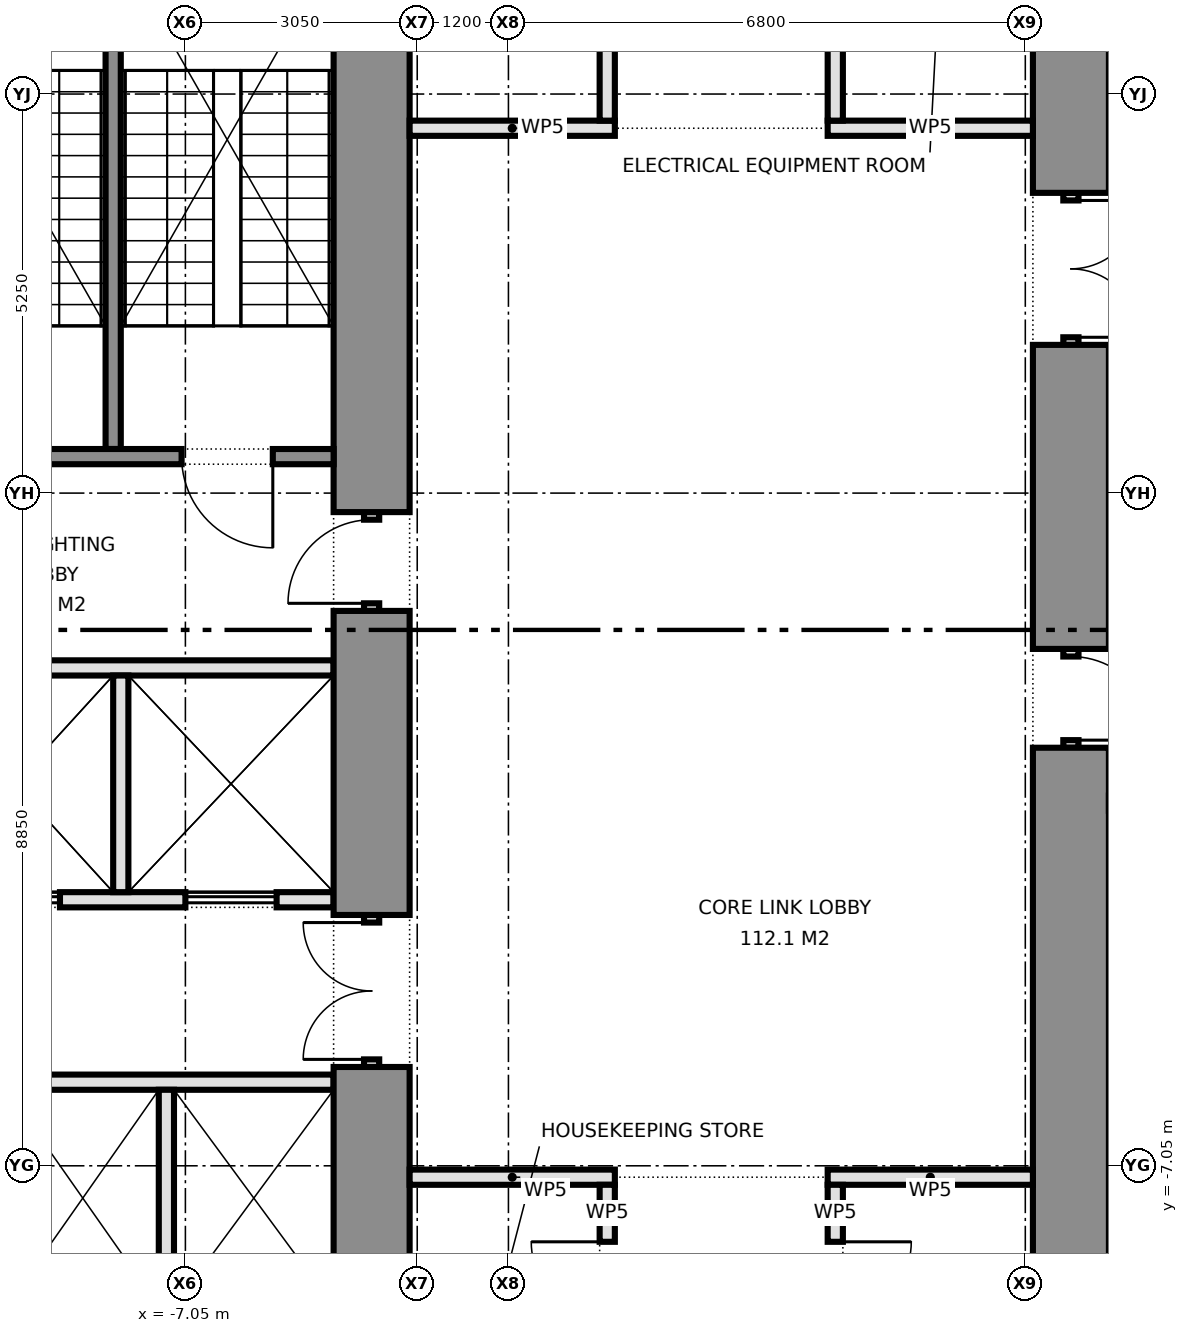
"""IFC4 building model, lengths in metres.
Left out: names, types, materials, properties, quantities, classifications, styles, units other than length and angle.
Written with IfcOpenShell. Run it as: python <this file> out.ifc"""

import sys

from ifc_helpers import new_model, si_unit, direction, frame, frame_2d, origin, place, context, subcontext, project, spatial, rectangle, extrude, element, fill, save


model = new_model("IFC4")
c1 = context("Model", 3, precision=1e-05, world=origin(), true_north=direction((0.0, 1.0)))
c2 = subcontext(c1, "Body", "Model", "MODEL_VIEW")
j1 = project(units=[si_unit("LENGTHUNIT", "METRE"), si_unit("PLANEANGLEUNIT", "RADIAN")], contexts=[c1])
p1 = place(None, origin())
s1 = spatial("IfcSite", under=j1, at=p1, CompositionType="ELEMENT")
p2 = place(p1, origin())
s2 = spatial("IfcBuilding", under=s1, at=p2, CompositionType="ELEMENT")
p3 = place(p2, frame((0.0, 0.0, 99.6)))
s3 = spatial("IfcBuildingStorey", under=s2, at=p3, CompositionType="ELEMENT", Elevation=99.6)
p4 = place(p3, frame((-4.6, -8.9, 0.0), z_axis=(0.0, 0.0, 1.0), x_axis=(0.0, 1.0, 0.0)))
e1 = element("IfcWall", 1, at=p4, inside=s3, PredefinedType="SHEAR", context=c2, shape_type="SweptSolid", body=[
    extrude(rectangle(XDim=3.15, YDim=1.0, at=frame_2d((1.575, 0.0))), origin(), (0.0, 0.0, 1.0), 4.2),
])
p5 = place(p3, frame((-4.6, -5.75, 0.0), z_axis=(0.0, 0.0, 1.0), x_axis=(0.0, 1.0, 0.0)))
e2 = element("IfcWall", 2, at=p5, inside=s3, PredefinedType="PARTITIONING", context=c2, shape_type="SweptSolid", body=[
    extrude(rectangle(XDim=2.0, YDim=0.2, at=frame_2d((1.0, 0.0))), origin(), (0.0, 0.0, 1.0), 2.4),
])
p6 = place(p5, frame((0.1, 0.0, 0.0)))
e3 = element("IfcOpeningElement", 3, at=p6, cuts=e2, PredefinedType="OPENING", context=c2, shape_type="SweptSolid", body=[
    extrude(rectangle(XDim=1.8, YDim=2.1, at=frame_2d((0.9, 1.05))), frame((0.0, 0.11, 0.0), z_axis=(0.0, -1.0, 0.0), x_axis=(1.0, 0.0, 0.0)), (0.0, 0.0, 1.0), 0.22),
])
p7 = place(p3, frame((-4.6, -3.75, 0.0), z_axis=(0.0, 0.0, 1.0), x_axis=(0.0, 1.0, 0.0)))
e4 = element("IfcWall", 4, at=p7, inside=s3, PredefinedType="SHEAR", context=c2, shape_type="SweptSolid", body=[
    extrude(rectangle(XDim=4.0, YDim=1.0, at=frame_2d((2.0, 0.0))), origin(), (0.0, 0.0, 1.0), 4.2),
])
p8 = place(p3, frame((-4.6, 0.25, 0.0), z_axis=(0.0, 0.0, 1.0), x_axis=(0.0, 1.0, 0.0)))
e5 = element("IfcWall", 5, at=p8, inside=s3, PredefinedType="PARTITIONING", context=c2, shape_type="SweptSolid", body=[
    extrude(rectangle(XDim=1.3, YDim=0.2, at=frame_2d((0.65, 0.0))), origin(), (0.0, 0.0, 1.0), 2.4),
])
p9 = place(p8, frame((0.1, 0.0, 0.0)))
e6 = element("IfcOpeningElement", 6, at=p9, cuts=e5, PredefinedType="OPENING", context=c2, shape_type="SweptSolid", body=[
    extrude(rectangle(XDim=1.1, YDim=2.1, at=frame_2d((0.55, 1.05))), frame((0.0, 0.11, 0.0), z_axis=(0.0, -1.0, 0.0), x_axis=(1.0, 0.0, 0.0)), (0.0, 0.0, 1.0), 0.22),
])
p10 = place(p3, frame((-4.6, 1.55, 0.0), z_axis=(0.0, 0.0, 1.0), x_axis=(0.0, 1.0, 0.0)))
e7 = element("IfcWall", 7, at=p10, inside=s3, PredefinedType="SHEAR", context=c2, shape_type="SweptSolid", body=[
    extrude(rectangle(XDim=7.35, YDim=1.0, at=frame_2d((3.675, 0.0))), origin(), (0.0, 0.0, 1.0), 4.2),
])
p11 = place(p3, frame((-13.9, -5.95, 0.0), z_axis=(0.0, 0.0, 1.0), x_axis=(1.0, 0.0, 0.0)))
e8 = element("IfcWall", 8, at=p11, inside=s3, PredefinedType="PARTITIONING", context=c2, shape_type="SweptSolid", body=[
    extrude(rectangle(XDim=8.8, YDim=0.2, at=frame_2d((4.4, 0.0))), origin(), (0.0, 0.0, 1.0), 4.2),
])
p12 = place(p11, frame((1.7, 0.0, 0.0)))
e9 = element("IfcOpeningElement", 9, at=p12, cuts=e8, PredefinedType="OPENING", context=c2, shape_type="SweptSolid", body=[
    extrude(rectangle(XDim=0.9, YDim=2.1, at=frame_2d((0.45, 1.05))), frame((0.0, 0.11, 0.0), z_axis=(0.0, -1.0, 0.0), x_axis=(1.0, 0.0, 0.0)), (0.0, 0.0, 1.0), 0.22),
])
p13 = place(p3, frame((-13.9, -3.55, 0.0), z_axis=(0.0, 0.0, 1.0), x_axis=(1.0, 0.0, 0.0)))
e10 = element("IfcWall", 10, at=p13, inside=s3, PredefinedType="PARTITIONING", context=c2, shape_type="SweptSolid", body=[
    extrude(rectangle(XDim=8.8, YDim=0.2, at=frame_2d((4.4, 0.0))), origin(), (0.0, 0.0, 1.0), 4.2),
])
p14 = place(p13, frame((0.65, 0.0, 0.0)))
e11 = element("IfcOpeningElement", 11, at=p14, cuts=e10, PredefinedType="OPENING", context=c2, shape_type="SweptSolid", body=[
    extrude(rectangle(XDim=1.8, YDim=2.1, at=frame_2d((0.9, 1.05))), frame((0.0, 0.11, 0.0), z_axis=(0.0, -1.0, 0.0), x_axis=(1.0, 0.0, 0.0)), (0.0, 0.0, 1.0), 0.22),
])
p15 = place(p13, frame((4.0, 0.0, 0.0)))
e12 = element("IfcOpeningElement", 12, at=p15, cuts=e10, PredefinedType="OPENING", context=c2, shape_type="SweptSolid", body=[
    extrude(rectangle(XDim=1.2, YDim=2.1, at=frame_2d((0.6, 1.05))), frame((0.0, 0.11, 0.0), z_axis=(0.0, -1.0, 0.0), x_axis=(1.0, 0.0, 0.0)), (0.0, 0.0, 1.0), 0.22),
])
p16 = place(p13, frame((6.85, 0.0, 0.0)))
e13 = element("IfcOpeningElement", 13, at=p16, cuts=e10, PredefinedType="OPENING", context=c2, shape_type="SweptSolid", body=[
    extrude(rectangle(XDim=1.2, YDim=2.1, at=frame_2d((0.6, 1.05))), frame((0.0, 0.11, 0.0), z_axis=(0.0, -1.0, 0.0), x_axis=(1.0, 0.0, 0.0)), (0.0, 0.0, 1.0), 0.22),
])
p17 = place(p3, frame((-13.9, -0.5, 0.0), z_axis=(0.0, 0.0, 1.0), x_axis=(1.0, 0.0, 0.0)))
e14 = element("IfcWall", 14, at=p17, inside=s3, PredefinedType="PARTITIONING", context=c2, shape_type="SweptSolid", body=[
    extrude(rectangle(XDim=8.8, YDim=0.2, at=frame_2d((4.4, 0.0))), origin(), (0.0, 0.0, 1.0), 4.2),
])
p18 = place(p3, frame((-13.9, 2.28, 0.0), z_axis=(0.0, 0.0, 1.0), x_axis=(1.0, 0.0, 0.0)))
e15 = element("IfcWall", 15, at=p18, inside=s3, PredefinedType="SHEAR", context=c2, shape_type="SweptSolid", body=[
    extrude(rectangle(XDim=8.8, YDim=0.2, at=frame_2d((4.4, 0.0))), origin(), (0.0, 0.0, 1.0), 4.2),
])
p19 = place(p18, frame((3.8, 0.0, 0.0)))
e16 = element("IfcOpeningElement", 16, at=p19, cuts=e15, PredefinedType="OPENING", context=c2, shape_type="SweptSolid", body=[
    extrude(rectangle(XDim=1.2, YDim=2.1, at=frame_2d((0.6, 1.05))), frame((0.0, 0.11, 0.0), z_axis=(0.0, -1.0, 0.0), x_axis=(1.0, 0.0, 0.0)), (0.0, 0.0, 1.0), 0.22),
])
p20 = place(p18, frame((6.8, 0.0, 0.0)))
e17 = element("IfcOpeningElement", 17, at=p20, cuts=e15, PredefinedType="OPENING", context=c2, shape_type="SweptSolid", body=[
    extrude(rectangle(XDim=1.2, YDim=2.1, at=frame_2d((0.6, 1.05))), frame((0.0, 0.11, 0.0), z_axis=(0.0, -1.0, 0.0), x_axis=(1.0, 0.0, 0.0)), (0.0, 0.0, 1.0), 0.22),
])
p21 = place(p3, frame((-8.0, 2.38, 0.0), z_axis=(0.0, 0.0, 1.0), x_axis=(0.0, 1.0, 0.0)))
e18 = element("IfcWall", 18, at=p21, inside=s3, PredefinedType="SHEAR", context=c2, shape_type="SweptSolid", body=[
    extrude(rectangle(XDim=6.52, YDim=0.2, at=frame_2d((3.26, 0.0))), origin(), (0.0, 0.0, 1.0), 4.2),
])
for number, where, z_axis, x_axis in (
    (19, (-7.3, -8.9, 0.0), (0.0, 0.0, 1.0), (0.0, 1.0, 0.0)),
    (20, (-7.9, -3.45, 0.0), (0.0, 0.0, 1.0), (0.0, 1.0, 0.0)),
):
    element("IfcWall", number, at=place(p3, frame(where, z_axis=z_axis, x_axis=x_axis)), inside=s3, PredefinedType="PARTITIONING", context=c2, shape_type="SweptSolid", body=[
        extrude(rectangle(XDim=2.85, YDim=0.2, at=frame_2d((1.425, 0.0))), origin(), (0.0, 0.0, 1.0), 4.2),
    ])
p22 = place(p3, frame((4.6, 8.9, 0.0), z_axis=(0.0, 0.0, 1.0), x_axis=(0.0, -1.0, 0.0)))
e21 = element("IfcWall", 21, at=p22, inside=s3, PredefinedType="SHEAR", context=c2, shape_type="SweptSolid", body=[
    extrude(rectangle(XDim=3.15, YDim=1.0, at=frame_2d((1.575, 0.0))), origin(), (0.0, 0.0, 1.0), 4.2),
])
p23 = place(p3, frame((4.6, 5.75, 0.0), z_axis=(0.0, 0.0, 1.0), x_axis=(0.0, -1.0, 0.0)))
e22 = element("IfcWall", 22, at=p23, inside=s3, PredefinedType="PARTITIONING", context=c2, shape_type="SweptSolid", body=[
    extrude(rectangle(XDim=2.0, YDim=0.2, at=frame_2d((1.0, 0.0))), origin(), (0.0, 0.0, 1.0), 2.4),
])
p24 = place(p23, frame((0.1, 0.0, 0.0)))
e23 = element("IfcOpeningElement", 23, at=p24, cuts=e22, PredefinedType="OPENING", context=c2, shape_type="SweptSolid", body=[
    extrude(rectangle(XDim=1.8, YDim=2.1, at=frame_2d((0.9, 1.05))), frame((0.0, 0.11, 0.0), z_axis=(0.0, -1.0, 0.0), x_axis=(1.0, 0.0, 0.0)), (0.0, 0.0, 1.0), 0.22),
])
p25 = place(p3, frame((4.6, 3.75, 0.0), z_axis=(0.0, 0.0, 1.0), x_axis=(0.0, -1.0, 0.0)))
e24 = element("IfcWall", 24, at=p25, inside=s3, PredefinedType="SHEAR", context=c2, shape_type="SweptSolid", body=[
    extrude(rectangle(XDim=4.0, YDim=1.0, at=frame_2d((2.0, 0.0))), origin(), (0.0, 0.0, 1.0), 4.2),
])
p26 = place(p3, frame((4.6, -0.25, 0.0), z_axis=(0.0, 0.0, 1.0), x_axis=(0.0, -1.0, 0.0)))
e25 = element("IfcWall", 25, at=p26, inside=s3, PredefinedType="PARTITIONING", context=c2, shape_type="SweptSolid", body=[
    extrude(rectangle(XDim=1.3, YDim=0.2, at=frame_2d((0.65, 0.0))), origin(), (0.0, 0.0, 1.0), 2.4),
])
p27 = place(p26, frame((0.1, 0.0, 0.0)))
e26 = element("IfcOpeningElement", 26, at=p27, cuts=e25, PredefinedType="OPENING", context=c2, shape_type="SweptSolid", body=[
    extrude(rectangle(XDim=1.1, YDim=2.1, at=frame_2d((0.55, 1.05))), frame((0.0, 0.11, 0.0), z_axis=(0.0, -1.0, 0.0), x_axis=(1.0, 0.0, 0.0)), (0.0, 0.0, 1.0), 0.22),
])
p28 = place(p3, frame((4.6, -1.55, 0.0), z_axis=(0.0, 0.0, 1.0), x_axis=(0.0, -1.0, 0.0)))
e27 = element("IfcWall", 27, at=p28, inside=s3, PredefinedType="SHEAR", context=c2, shape_type="SweptSolid", body=[
    extrude(rectangle(XDim=7.35, YDim=1.0, at=frame_2d((3.675, 0.0))), origin(), (0.0, 0.0, 1.0), 4.2),
])
for number, where, z_axis, x_axis in (
    (28, (-4.1, -7.2, 0.0), (0.0, 0.0, 1.0), (1.0, 0.0, 0.0)),
    (29, (1.4, -7.2, 0.0), (0.0, 0.0, 1.0), (1.0, 0.0, 0.0)),
    (30, (-4.1, 6.6, 0.0), (0.0, 0.0, 1.0), (1.0, 0.0, 0.0)),
    (31, (1.4, 6.6, 0.0), (0.0, 0.0, 1.0), (1.0, 0.0, 0.0)),
):
    element("IfcWall", number, at=place(p3, frame(where, z_axis=z_axis, x_axis=x_axis)), inside=s3, PredefinedType="PARTITIONING", context=c2, shape_type="SweptSolid", body=[
        extrude(rectangle(XDim=2.7, YDim=0.2, at=frame_2d((1.35, 0.0))), origin(), (0.0, 0.0, 1.0), 4.2),
    ])
p29 = place(p3, frame((1.5, -9.8, 0.0), z_axis=(0.0, 0.0, 1.0), x_axis=(0.0, 1.0, 0.0)))
e32 = element("IfcWall", 32, at=p29, inside=s3, PredefinedType="PARTITIONING", context=c2, shape_type="SweptSolid", body=[
    extrude(rectangle(XDim=2.5, YDim=0.2, at=frame_2d((1.25, 0.0))), origin(), (0.0, 0.0, 1.0), 4.2),
])
p30 = place(p29, frame((0.75, 0.0, 0.0)))
e33 = element("IfcOpeningElement", 33, at=p30, cuts=e32, PredefinedType="OPENING", context=c2, shape_type="SweptSolid", body=[
    extrude(rectangle(XDim=1.0, YDim=2.1, at=frame_2d((0.5, 1.05))), frame((0.0, 0.11, 0.0), z_axis=(0.0, -1.0, 0.0), x_axis=(1.0, 0.0, 0.0)), (0.0, 0.0, 1.0), 0.22),
])
p31 = place(p3, frame((1.5, 6.7, 0.0), z_axis=(0.0, 0.0, 1.0), x_axis=(0.0, 1.0, 0.0)))
e34 = element("IfcWall", 34, at=p31, inside=s3, PredefinedType="PARTITIONING", context=c2, shape_type="SweptSolid", body=[
    extrude(rectangle(XDim=3.1, YDim=0.2, at=frame_2d((1.55, 0.0))), origin(), (0.0, 0.0, 1.0), 4.2),
])
p32 = place(p31, frame((0.95, 0.0, 0.0)))
e35 = element("IfcOpeningElement", 35, at=p32, cuts=e34, PredefinedType="OPENING", context=c2, shape_type="SweptSolid", body=[
    extrude(rectangle(XDim=1.2, YDim=2.1, at=frame_2d((0.6, 1.05))), frame((0.0, 0.11, 0.0), z_axis=(0.0, -1.0, 0.0), x_axis=(1.0, 0.0, 0.0)), (0.0, 0.0, 1.0), 0.22),
])
p33 = place(p3, frame((-1.5, -9.8, 0.0), z_axis=(0.0, 0.0, 1.0), x_axis=(0.0, 1.0, 0.0)))
e36 = element("IfcWall", 36, at=p33, inside=s3, PredefinedType="PARTITIONING", context=c2, shape_type="SweptSolid", body=[
    extrude(rectangle(XDim=2.5, YDim=0.2, at=frame_2d((1.25, 0.0))), origin(), (0.0, 0.0, 1.0), 4.2),
])
p34 = place(p33, frame((0.75, 0.0, 0.0)))
e37 = element("IfcOpeningElement", 37, at=p34, cuts=e36, PredefinedType="OPENING", context=c2, shape_type="SweptSolid", body=[
    extrude(rectangle(XDim=1.0, YDim=2.1, at=frame_2d((0.5, 1.05))), frame((0.0, 0.11, 0.0), z_axis=(0.0, -1.0, 0.0), x_axis=(1.0, 0.0, 0.0)), (0.0, 0.0, 1.0), 0.22),
])
p35 = place(p3, frame((-1.5, 6.7, 0.0), z_axis=(0.0, 0.0, 1.0), x_axis=(0.0, 1.0, 0.0)))
e38 = element("IfcWall", 38, at=p35, inside=s3, PredefinedType="PARTITIONING", context=c2, shape_type="SweptSolid", body=[
    extrude(rectangle(XDim=3.1, YDim=0.2, at=frame_2d((1.55, 0.0))), origin(), (0.0, 0.0, 1.0), 4.2),
])
p36 = place(p35, frame((0.95, 0.0, 0.0)))
e39 = element("IfcOpeningElement", 39, at=p36, cuts=e38, PredefinedType="OPENING", context=c2, shape_type="SweptSolid", body=[
    extrude(rectangle(XDim=1.2, YDim=2.1, at=frame_2d((0.6, 1.05))), frame((0.0, 0.11, 0.0), z_axis=(0.0, -1.0, 0.0), x_axis=(1.0, 0.0, 0.0)), (0.0, 0.0, 1.0), 0.22),
])
p37 = place(p6, origin())
e40 = element("IfcDoor", 40, at=p37, inside=s3, OperationType="DOUBLE_DOOR_SINGLE_SWING", PredefinedType="DOOR", context=c2, shape_type="SweptSolid", body=[
    extrude(rectangle(XDim=1.8, YDim=2.1, at=frame_2d((0.9, 1.05))), frame((0.0, 0.025, 0.0), z_axis=(0.0, -1.0, 0.0), x_axis=(1.0, 0.0, 0.0)), (0.0, 0.0, 1.0), 0.05),
])
fill(e3, e40)
p38 = place(p9, origin())
e41 = element("IfcDoor", 41, at=p38, inside=s3, OperationType="SINGLE_SWING_LEFT", PredefinedType="DOOR", context=c2, shape_type="SweptSolid", body=[
    extrude(rectangle(XDim=1.1, YDim=2.1, at=frame_2d((0.55, 1.05))), frame((0.0, 0.025, 0.0), z_axis=(0.0, -1.0, 0.0), x_axis=(1.0, 0.0, 0.0)), (0.0, 0.0, 1.0), 0.05),
])
fill(e6, e41)
p39 = place(p15, origin())
e42 = element("IfcDoor", 42, at=p39, inside=s3, OperationType="DOUBLE_DOOR_SLIDING", PredefinedType="DOOR", context=c2, shape_type="SweptSolid", body=[
    extrude(rectangle(XDim=1.2, YDim=2.1, at=frame_2d((0.6, 1.05))), frame((0.0, 0.025, 0.0), z_axis=(0.0, -1.0, 0.0), x_axis=(1.0, 0.0, 0.0)), (0.0, 0.0, 1.0), 0.05),
])
fill(e12, e42)
p40 = place(p16, origin())
e43 = element("IfcDoor", 43, at=p40, inside=s3, OperationType="DOUBLE_DOOR_SLIDING", PredefinedType="DOOR", context=c2, shape_type="SweptSolid", body=[
    extrude(rectangle(XDim=1.2, YDim=2.1, at=frame_2d((0.6, 1.05))), frame((0.0, 0.025, 0.0), z_axis=(0.0, -1.0, 0.0), x_axis=(1.0, 0.0, 0.0)), (0.0, 0.0, 1.0), 0.05),
])
fill(e13, e43)
p41 = place(p20, frame((1.2, 0.0, 0.0), z_axis=(0.0, 0.0, 1.0), x_axis=(-1.0, 0.0, 0.0)))
e44 = element("IfcDoor", 44, at=p41, inside=s3, OperationType="SINGLE_SWING_LEFT", PredefinedType="DOOR", context=c2, shape_type="SweptSolid", body=[
    extrude(rectangle(XDim=1.2, YDim=2.1, at=frame_2d((0.6, 1.05))), frame((0.0, 0.025, 0.0), z_axis=(0.0, -1.0, 0.0), x_axis=(1.0, 0.0, 0.0)), (0.0, 0.0, 1.0), 0.05),
])
fill(e17, e44)
p42 = place(p24, origin())
e45 = element("IfcDoor", 45, at=p42, inside=s3, OperationType="DOUBLE_DOOR_SINGLE_SWING", PredefinedType="DOOR", context=c2, shape_type="SweptSolid", body=[
    extrude(rectangle(XDim=1.8, YDim=2.1, at=frame_2d((0.9, 1.05))), frame((0.0, 0.025, 0.0), z_axis=(0.0, -1.0, 0.0), x_axis=(1.0, 0.0, 0.0)), (0.0, 0.0, 1.0), 0.05),
])
fill(e23, e45)
p43 = place(p27, origin())
e46 = element("IfcDoor", 46, at=p43, inside=s3, OperationType="SINGLE_SWING_RIGHT", PredefinedType="DOOR", context=c2, shape_type="SweptSolid", body=[
    extrude(rectangle(XDim=1.1, YDim=2.1, at=frame_2d((0.55, 1.05))), frame((0.0, 0.025, 0.0), z_axis=(0.0, -1.0, 0.0), x_axis=(1.0, 0.0, 0.0)), (0.0, 0.0, 1.0), 0.05),
])
fill(e26, e46)
p44 = place(p34, origin())
e47 = element("IfcDoor", 47, at=p44, inside=s3, OperationType="SINGLE_SWING_RIGHT", PredefinedType="DOOR", context=c2, shape_type="SweptSolid", body=[
    extrude(rectangle(XDim=1.0, YDim=2.1, at=frame_2d((0.5, 1.05))), frame((0.0, 0.025, 0.0), z_axis=(0.0, -1.0, 0.0), x_axis=(1.0, 0.0, 0.0)), (0.0, 0.0, 1.0), 0.05),
])
fill(e37, e47)
p45 = place(p30, frame((1.0, 0.0, 0.0), z_axis=(0.0, 0.0, 1.0), x_axis=(-1.0, 0.0, 0.0)))
e48 = element("IfcDoor", 48, at=p45, inside=s3, OperationType="SINGLE_SWING_LEFT", PredefinedType="DOOR", context=c2, shape_type="SweptSolid", body=[
    extrude(rectangle(XDim=1.0, YDim=2.1, at=frame_2d((0.5, 1.05))), frame((0.0, 0.025, 0.0), z_axis=(0.0, -1.0, 0.0), x_axis=(1.0, 0.0, 0.0)), (0.0, 0.0, 1.0), 0.05),
])
fill(e33, e48)
save(model, sys.argv[1])
